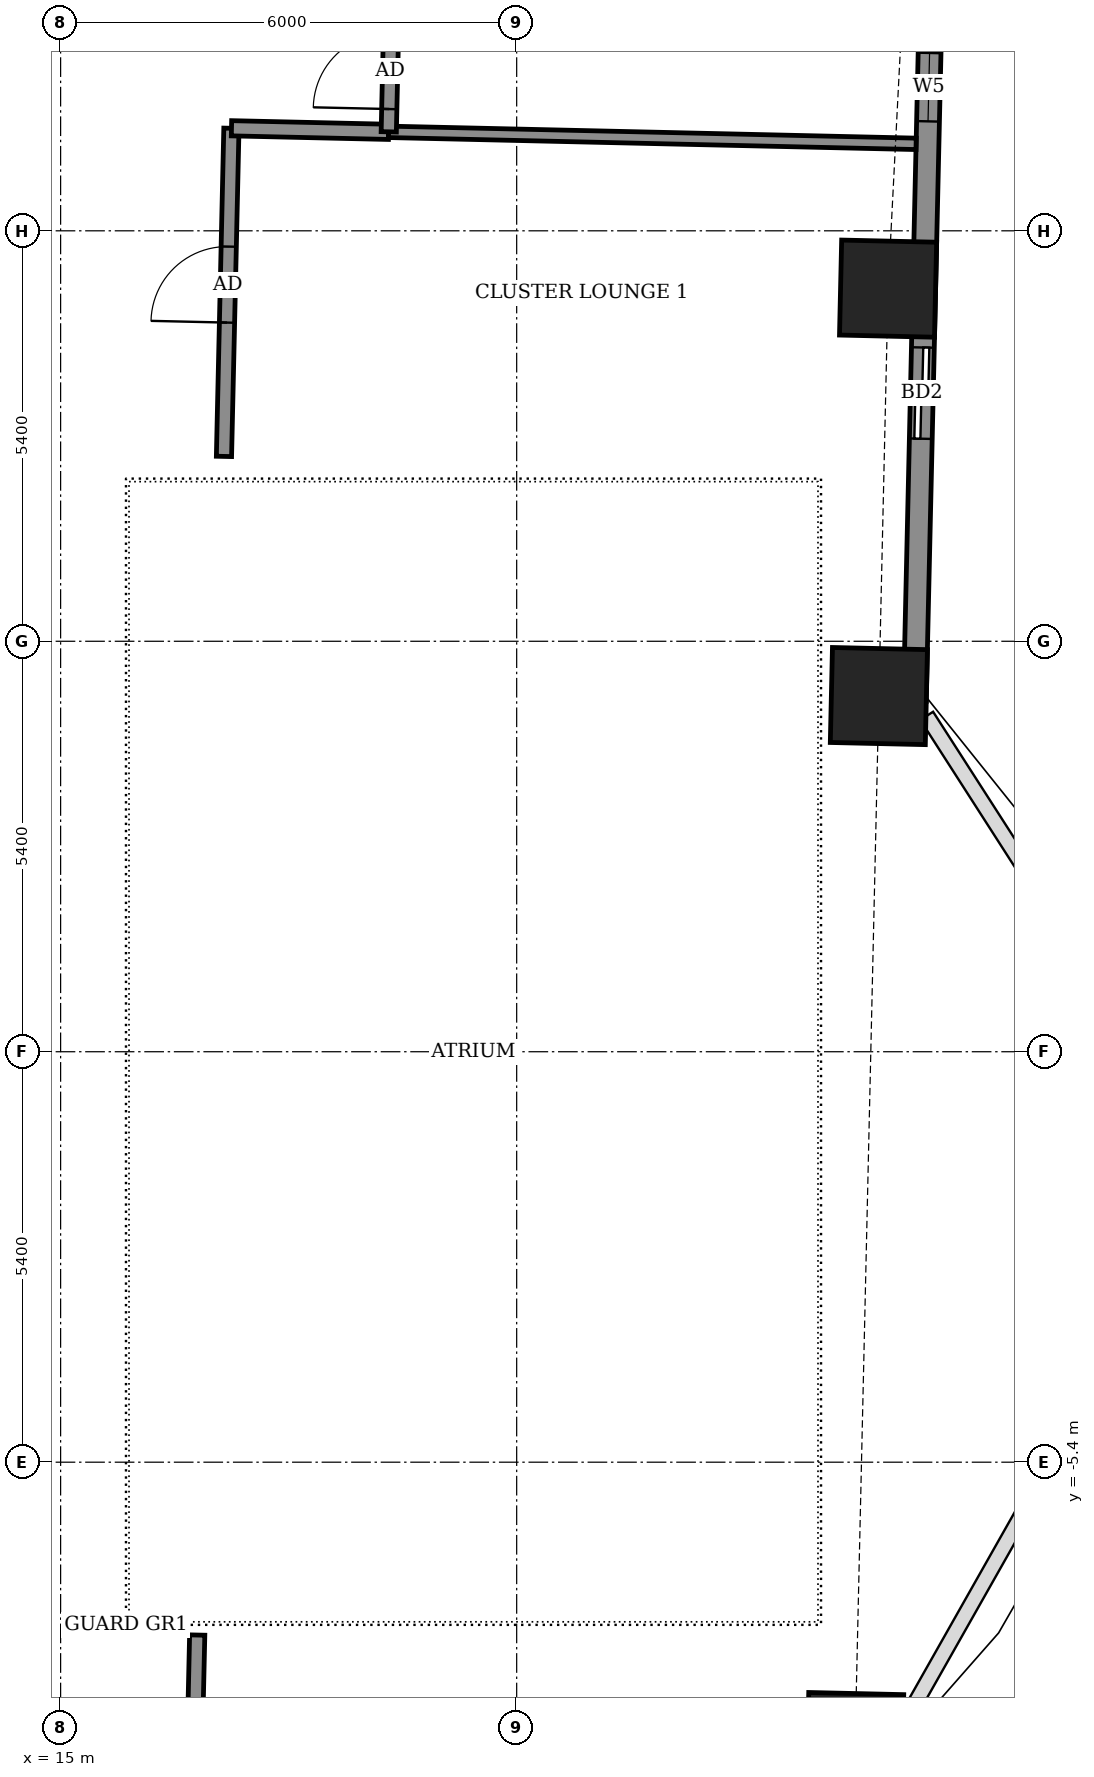
"""IFC4 building model, lengths in metres.
Left out: names, types, materials, properties, quantities, classifications, styles, units other than length and angle.
Written with IfcOpenShell. Run it as: python <this file> out.ifc"""

import sys

from ifc_helpers import new_model, si_unit, direction, frame, frame_2d, origin, origin_2d, place, context, subcontext, project, spatial, rectangle, extrude, element, fill, save


model = new_model("IFC4")
c1 = context("Model", 3, precision=1e-05, world=origin(), true_north=direction((0.0, 1.0)))
c2 = subcontext(c1, "Body", "Model", "MODEL_VIEW")
j1 = project(units=[si_unit("LENGTHUNIT", "METRE"), si_unit("PLANEANGLEUNIT", "RADIAN")], contexts=[c1])
p1 = place(None, origin())
s1 = spatial("IfcSite", under=j1, at=p1, CompositionType="ELEMENT")
p2 = place(p1, origin())
s2 = spatial("IfcBuilding", under=s1, at=p2, CompositionType="ELEMENT")
p3 = place(p2, frame((0.0, 0.0, 152.7)))
s3 = spatial("IfcBuildingStorey", under=s2, at=p3, CompositionType="ELEMENT", Elevation=152.7)
for number, where, z_axis, x_axis in (
    (1, (25.453, -9.069, -0.55), (0.0, 0.0, 1.0), (0.023, 1.0, 0.0)),
    (2, (25.765, 4.679, -0.55), (0.0, 0.0, 1.0), (0.023, 1.0, 0.0)),
    (3, (25.886, 10.039, -0.55), (0.0, 0.0, 1.0), (0.023, 1.0, 0.0)),
):
    element("IfcColumn", number, at=place(p3, frame(where, z_axis=z_axis, x_axis=x_axis)), inside=s3, PredefinedType="COLUMN", context=c2, shape_type="SweptSolid", body=[
        extrude(rectangle(XDim=1.25, YDim=1.25, at=origin_2d()), origin(), (0.0, 0.0, 1.0), 3.6),
    ])
p4 = place(p3, frame((26.238, 4.613, 0.0), z_axis=(0.0, 0.0, 1.0), x_axis=(0.022761056451, 0.999740933597, 0.0)))
e4 = element("IfcWall", 4, at=p4, inside=s3, PredefinedType="SOLIDWALL", context=c2, shape_type="SweptSolid", body=[
    extrude(rectangle(XDim=10.63, YDim=0.3, at=frame_2d((5.315, 0.0))), origin(), (0.0, 0.0, 1.0), 3.05),
])
p5 = place(p4, frame((3.453, 0.0, 0.0)))
e5 = element("IfcOpeningElement", 5, at=p5, cuts=e4, PredefinedType="OPENING", context=c2, shape_type="SweptSolid", body=[
    extrude(rectangle(XDim=1.2, YDim=2.4, at=frame_2d((0.6, 1.2))), frame((0.0, 0.16, 0.0), z_axis=(0.0, -1.0, 0.0), x_axis=(1.0, 0.0, 0.0)), (0.0, 0.0, 1.0), 0.32),
])
p6 = place(p4, frame((7.629, 0.0, 0.9)))
e6 = element("IfcOpeningElement", 6, at=p6, cuts=e4, PredefinedType="OPENING", context=c2, shape_type="SweptSolid", body=[
    extrude(rectangle(XDim=0.9, YDim=1.5, at=frame_2d((0.45, 0.75))), frame((0.0, 0.16, 0.0), z_axis=(0.0, -1.0, 0.0), x_axis=(1.0, 0.0, 0.0)), (0.0, 0.0, 1.0), 0.32),
])
p7 = place(p3, frame((16.611, -15.868, 0.0), z_axis=(0.0, 0.0, 1.0), x_axis=(0.022698399288, 0.999742358145, 0.0)))
e7 = element("IfcWall", 7, at=p7, inside=s3, PredefinedType="PARTITIONING", context=c2, shape_type="SweptSolid", body=[
    extrude(rectangle(XDim=8.196, YDim=0.2, at=frame_2d((4.098, 0.0))), origin(), (0.0, 0.0, 1.0), 3.05),
])
p8 = place(p7, frame((3.025, 0.0, 0.0)))
e8 = element("IfcOpeningElement", 8, at=p8, cuts=e7, PredefinedType="OPENING", context=c2, shape_type="SweptSolid", body=[
    extrude(rectangle(XDim=0.9, YDim=2.1, at=frame_2d((0.45, 1.05))), frame((0.0, 0.11, 0.0), z_axis=(0.0, -1.0, 0.0), x_axis=(1.0, 0.0, 0.0)), (0.0, 0.0, 1.0), 0.22),
])
p9 = place(p7, frame((5.786, 0.0, 0.0)))
e9 = element("IfcOpeningElement", 9, at=p9, cuts=e7, PredefinedType="OPENING", context=c2, shape_type="SweptSolid", body=[
    extrude(rectangle(XDim=1.0, YDim=2.1, at=frame_2d((0.5, 1.05))), frame((0.0, 0.11, 0.0), z_axis=(0.0, -1.0, 0.0), x_axis=(1.0, 0.0, 0.0)), (0.0, 0.0, 1.0), 0.22),
])
p10 = place(p3, frame((17.149, 7.832, 0.0), z_axis=(0.0, 0.0, 1.0), x_axis=(0.022729111383, 0.999741660378, 0.0)))
e10 = element("IfcWall", 10, at=p10, inside=s3, PredefinedType="PARTITIONING", context=c2, shape_type="SweptSolid", body=[
    extrude(rectangle(XDim=4.318, YDim=0.2, at=frame_2d((2.159, 0.0))), origin(), (0.0, 0.0, 1.0), 3.05),
])
p11 = place(p10, frame((1.761, 0.0, 0.0)))
e11 = element("IfcOpeningElement", 11, at=p11, cuts=e10, PredefinedType="OPENING", context=c2, shape_type="SweptSolid", body=[
    extrude(rectangle(XDim=1.0, YDim=2.1, at=frame_2d((0.5, 1.05))), frame((0.0, 0.11, 0.0), z_axis=(0.0, -1.0, 0.0), x_axis=(1.0, 0.0, 0.0)), (0.0, 0.0, 1.0), 0.22),
])
p12 = place(p3, frame((17.248, 12.149, 0.0), z_axis=(0.0, 0.0, 1.0), x_axis=(0.999742931749, -0.02267312106, 0.0)))
e12 = element("IfcWall", 12, at=p12, inside=s3, PredefinedType="PARTITIONING", context=c2, shape_type="SweptSolid", body=[
    extrude(rectangle(XDim=2.067, YDim=0.2, at=frame_2d((1.034, 0.0))), origin(), (0.0, 0.0, 1.0), 3.05),
])
p13 = place(p3, frame((19.315, 12.102, 0.0), z_axis=(0.0, 0.0, 1.0), x_axis=(0.999741072391, -0.022754959327, 0.0)))
e13 = element("IfcWall", 13, at=p13, inside=s3, PredefinedType="PARTITIONING", context=c2, shape_type="SweptSolid", body=[
    extrude(rectangle(XDim=6.942, YDim=0.15, at=frame_2d((3.471, 0.0))), origin(), (0.0, 0.0, 1.0), 2.55),
])
p14 = place(p3, frame((19.317, 12.102, 0.0), z_axis=(0.0, 0.0, 1.0), x_axis=(0.02279537805, 0.999740151609, 0.0)))
e14 = element("IfcWall", 14, at=p14, inside=s3, PredefinedType="PARTITIONING", context=c2, shape_type="SweptSolid", body=[
    extrude(rectangle(XDim=1.5, YDim=0.2, at=frame_2d((0.75, 0.0))), origin(), (0.0, 0.0, 1.0), 3.05),
])
p15 = place(p14, frame((0.3, 0.0, 0.0)))
e15 = element("IfcOpeningElement", 15, at=p15, cuts=e14, PredefinedType="OPENING", context=c2, shape_type="SweptSolid", body=[
    extrude(rectangle(XDim=1.0, YDim=2.1, at=frame_2d((0.5, 1.05))), frame((0.0, 0.11, 0.0), z_axis=(0.0, -1.0, 0.0), x_axis=(1.0, 0.0, 0.0)), (0.0, 0.0, 1.0), 0.22),
])
p16 = place(p5, origin())
e16 = element("IfcDoor", 16, at=p16, inside=s3, OperationType="SLIDING_TO_LEFT", PredefinedType="DOOR", context=c2, shape_type="SweptSolid", body=[
    extrude(rectangle(XDim=1.2, YDim=2.4, at=frame_2d((0.6, 1.2))), frame((0.0, 0.025, 0.0), z_axis=(0.0, -1.0, 0.0), x_axis=(1.0, 0.0, 0.0)), (0.0, 0.0, 1.0), 0.05),
])
fill(e5, e16)
p17 = place(p6, origin())
e17 = element("IfcWindow", 17, at=p17, inside=s3, PartitioningType="SINGLE_PANEL", PredefinedType="WINDOW", context=c2, shape_type="SweptSolid", body=[
    extrude(rectangle(XDim=0.9, YDim=1.5, at=frame_2d((0.45, 0.75))), frame((0.0, 0.03, 0.0), z_axis=(0.0, -1.0, 0.0), x_axis=(1.0, 0.0, 0.0)), (0.0, 0.0, 1.0), 0.06),
])
fill(e6, e17)
p18 = place(p11, origin())
e18 = element("IfcDoor", 18, at=p18, inside=s3, OperationType="SINGLE_SWING_RIGHT", PredefinedType="DOOR", context=c2, shape_type="SweptSolid", body=[
    extrude(rectangle(XDim=1.0, YDim=2.1, at=frame_2d((0.5, 1.05))), frame((0.0, 0.025, 0.0), z_axis=(0.0, -1.0, 0.0), x_axis=(1.0, 0.0, 0.0)), (0.0, 0.0, 1.0), 0.05),
])
fill(e11, e18)
p19 = place(p15, origin())
e19 = element("IfcDoor", 19, at=p19, inside=s3, OperationType="SINGLE_SWING_LEFT", PredefinedType="DOOR", context=c2, shape_type="SweptSolid", body=[
    extrude(rectangle(XDim=1.0, YDim=2.1, at=frame_2d((0.5, 1.05))), frame((0.0, 0.025, 0.0), z_axis=(0.0, -1.0, 0.0), x_axis=(1.0, 0.0, 0.0)), (0.0, 0.0, 1.0), 0.05),
])
fill(e15, e19)
save(model, sys.argv[1])
